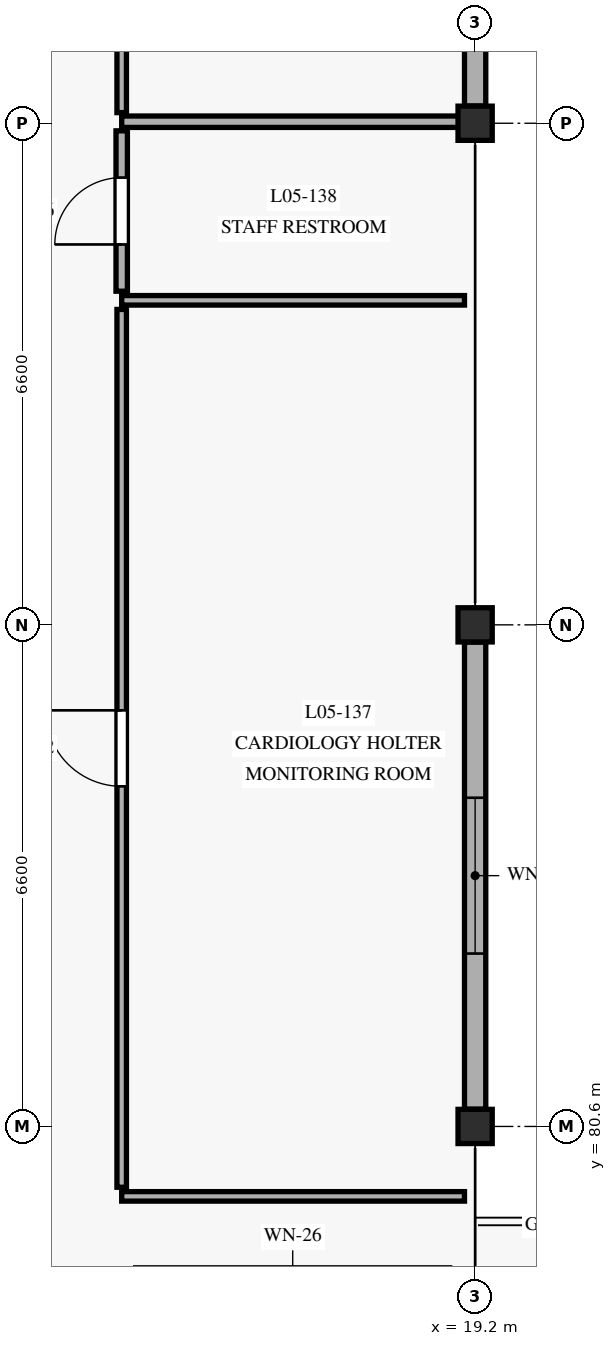
"""IFC4 building model, lengths in metres.
Left out: names, types, materials, properties, quantities, classifications, styles, units other than length and angle.
Written with IfcOpenShell. Run it as: python <this file> out.ifc"""

import sys

from ifc_helpers import new_model, si_unit, direction, frame, frame_2d, origin, origin_with_axes, origin_2d, place, context, subcontext, project, spatial, rectangle, extrude, element, fill, save


model = new_model("IFC4")
c1 = context("Model", 3, precision=1e-05, world=origin(), true_north=direction((0.0, 1.0)))
c2 = subcontext(c1, "Body", "Model", "MODEL_VIEW")
j1 = project(units=[si_unit("LENGTHUNIT", "METRE"), si_unit("PLANEANGLEUNIT", "RADIAN")], contexts=[c1])
p1 = place(None, origin())
s1 = spatial("IfcSite", under=j1, at=p1, CompositionType="ELEMENT")
p2 = place(p1, origin())
s2 = spatial("IfcBuilding", under=s1, at=p2, CompositionType="ELEMENT")
p3 = place(p2, frame((0.0, 0.0, 17.55)))
s3 = spatial("IfcBuildingStorey", under=s2, at=p3, CompositionType="ELEMENT", Elevation=17.55)
for number, where, z_axis, x_axis in (
    (1, (19.2, 80.6, 0.0), (0.0, 0.0, 1.0), (1.0, 0.0, 0.0)),
    (2, (19.2, 87.2, 0.0), (0.0, 0.0, 1.0), (1.0, 0.0, 0.0)),
    (3, (19.2, 93.8, 0.0), (0.0, 0.0, 1.0), (1.0, 0.0, 0.0)),
):
    element("IfcColumn", number, at=place(p3, frame(where, z_axis=z_axis, x_axis=x_axis)), inside=s3, PredefinedType="COLUMN", context=c2, shape_type="SweptSolid", body=[
        extrude(rectangle(XDim=0.45, YDim=0.45, at=origin_2d()), origin(), (0.0, 0.0, 1.0), 4.05),
    ])
p4 = place(p3, frame((19.2, 80.827, 0.0), z_axis=(0.0, 0.0, 1.0), x_axis=(0.0, 1.0, 0.0)))
e4 = element("IfcWall", 4, at=p4, inside=s3, PredefinedType="SOLIDWALL", context=c2, shape_type="SweptSolid", body=[
    extrude(rectangle(XDim=6.146, YDim=0.28, at=frame_2d((3.073, 0.0))), origin(), (0.0, 0.0, 1.0), 3.39),
])
p5 = place(p4, frame((2.048, 0.0, 0.8)))
e5 = element("IfcOpeningElement", 5, at=p5, cuts=e4, PredefinedType="OPENING", context=c2, shape_type="SweptSolid", body=[
    extrude(rectangle(XDim=2.05, YDim=1.95, at=frame_2d((1.025, 0.975))), frame((0.0, 0.15, 0.0), z_axis=(0.0, -1.0, 0.0), x_axis=(1.0, 0.0, 0.0)), (0.0, 0.0, 1.0), 0.3),
])
p6 = place(p3, frame((19.2, 94.027, 0.0), z_axis=(0.0, 0.0, 1.0), x_axis=(0.0, 1.0, 0.0)))
e6 = element("IfcWall", 6, at=p6, inside=s3, PredefinedType="SOLIDWALL", context=c2, shape_type="SweptSolid", body=[
    extrude(rectangle(XDim=6.146, YDim=0.28, at=frame_2d((3.073, 0.0))), origin(), (0.0, 0.0, 1.0), 3.39),
])
p7 = place(p6, frame((2.048, 0.0, 0.8)))
e7 = element("IfcOpeningElement", 7, at=p7, cuts=e6, PredefinedType="OPENING", context=c2, shape_type="SweptSolid", body=[
    extrude(rectangle(XDim=2.05, YDim=1.95, at=frame_2d((1.025, 0.975))), frame((0.0, 0.15, 0.0), z_axis=(0.0, -1.0, 0.0), x_axis=(1.0, 0.0, 0.0)), (0.0, 0.0, 1.0), 0.3),
])
p8 = place(p3, frame((14.55, 79.8, 0.0), z_axis=(0.0, 0.0, 1.0), x_axis=(0.0, 1.0, 0.0)))
e8 = element("IfcWall", 8, at=p8, inside=s3, PredefinedType="PARTITIONING", context=c2, shape_type="SweptSolid", body=[
    extrude(rectangle(XDim=11.55, YDim=0.125, at=frame_2d((5.775, 0.0))), origin(), (0.0, 0.0, 1.0), 3.365),
])
p9 = place(p8, frame((5.275, 0.0, 0.0)))
e9 = element("IfcOpeningElement", 9, at=p9, cuts=e8, PredefinedType="OPENING", context=c2, shape_type="SweptSolid", body=[
    extrude(rectangle(XDim=1.0, YDim=2.15, at=frame_2d((0.5, 1.075))), frame((0.0, 0.073, 0.0), z_axis=(0.0, -1.0, 0.0), x_axis=(1.0, 0.0, 0.0)), (0.0, 0.0, 1.0), 0.145),
])
for number, where, z_axis, x_axis in (
    (10, (14.55, 79.68, 0.0), (0.0, 0.0, 1.0), (1.0, 0.0, 0.0)),
    (11, (14.55, 91.47, 0.0), (0.0, 0.0, 1.0), (1.0, 0.0, 0.0)),
):
    element("IfcWall", number, at=place(p3, frame(where, z_axis=z_axis, x_axis=x_axis)), inside=s3, PredefinedType="PARTITIONING", context=c2, shape_type="SweptSolid", body=[
        extrude(rectangle(XDim=4.51, YDim=0.125, at=frame_2d((2.255, 0.0))), origin(), (0.0, 0.0, 1.0), 3.385),
    ])
p10 = place(p3, frame((14.55, 91.59, 0.0), z_axis=(0.0, 0.0, 1.0), x_axis=(0.0, 1.0, 0.0)))
e12 = element("IfcWall", 12, at=p10, inside=s3, PredefinedType="PARTITIONING", context=c2, shape_type="SweptSolid", body=[
    extrude(rectangle(XDim=2.11, YDim=0.15, at=frame_2d((1.055, 0.0))), origin(), (0.0, 0.0, 1.0), 3.365),
])
p11 = place(p10, frame((0.615, 0.0, 0.0)))
e13 = element("IfcOpeningElement", 13, at=p11, cuts=e12, PredefinedType="OPENING", context=c2, shape_type="SweptSolid", body=[
    extrude(rectangle(XDim=0.88, YDim=2.1, at=frame_2d((0.44, 1.05))), frame((0.0, 0.085, 0.0), z_axis=(0.0, -1.0, 0.0), x_axis=(1.0, 0.0, 0.0)), (0.0, 0.0, 1.0), 0.17),
])
p12 = place(p3, frame((14.55, 93.82, 0.0), z_axis=(0.0, 0.0, 1.0), x_axis=(1.0, 0.0, 0.0)))
e14 = element("IfcWall", 14, at=p12, inside=s3, PredefinedType="PARTITIONING", context=c2, shape_type="SweptSolid", body=[
    extrude(rectangle(XDim=4.51, YDim=0.15, at=frame_2d((2.255, 0.0))), origin(), (0.0, 0.0, 1.0), 3.365),
])
p13 = place(p3, frame((14.55, 93.94, 0.0), z_axis=(0.0, 0.0, 1.0), x_axis=(0.0, 1.0, 0.0)))
e15 = element("IfcWall", 15, at=p13, inside=s3, PredefinedType="PARTITIONING", context=c2, shape_type="SweptSolid", body=[
    extrude(rectangle(XDim=10.6, YDim=0.125, at=frame_2d((5.3, 0.0))), origin(), (0.0, 0.0, 1.0), 3.365),
])
p14 = place(p13, frame((4.775, 0.0, 0.0)))
e16 = element("IfcOpeningElement", 16, at=p14, cuts=e15, PredefinedType="OPENING", context=c2, shape_type="SweptSolid", body=[
    extrude(rectangle(XDim=0.9, YDim=2.12, at=frame_2d((0.45, 1.06))), frame((0.0, 0.073, 0.0), z_axis=(0.0, -1.0, 0.0), x_axis=(1.0, 0.0, 0.0)), (0.0, 0.0, 1.0), 0.145),
])
p15 = place(p5, origin_with_axes())
e17 = element("IfcWindow", 17, at=p15, inside=s3, PartitioningType="SINGLE_PANEL", PredefinedType="WINDOW", context=c2, shape_type="SweptSolid", body=[
    extrude(rectangle(XDim=2.05, YDim=1.95, at=frame_2d((1.025, 0.975))), frame((0.0, 0.03, 0.0), z_axis=(0.0, -1.0, 0.0), x_axis=(1.0, 0.0, 0.0)), (0.0, 0.0, 1.0), 0.06),
])
fill(e5, e17)
p16 = place(p9, frame((1.0, 0.0, 0.0), z_axis=(0.0, 0.0, 1.0), x_axis=(-1.0, 0.0, 0.0)))
e18 = element("IfcDoor", 18, at=p16, inside=s3, OperationType="SINGLE_SWING_LEFT", PredefinedType="DOOR", context=c2, shape_type="SweptSolid", body=[
    extrude(rectangle(XDim=1.0, YDim=2.15, at=frame_2d((0.5, 1.075))), frame((0.0, 0.025, 0.0), z_axis=(0.0, -1.0, 0.0), x_axis=(1.0, 0.0, 0.0)), (0.0, 0.0, 1.0), 0.05),
])
fill(e9, e18)
p17 = place(p11, frame((0.88, 0.0, 0.0), z_axis=(0.0, 0.0, 1.0), x_axis=(-1.0, 0.0, 0.0)))
e19 = element("IfcDoor", 19, at=p17, inside=s3, OperationType="SINGLE_SWING_RIGHT", PredefinedType="DOOR", context=c2, shape_type="SweptSolid", body=[
    extrude(rectangle(XDim=0.88, YDim=2.1, at=frame_2d((0.44, 1.05))), frame((0.0, 0.025, 0.0), z_axis=(0.0, -1.0, 0.0), x_axis=(1.0, 0.0, 0.0)), (0.0, 0.0, 1.0), 0.05),
])
fill(e13, e19)
save(model, sys.argv[1])
